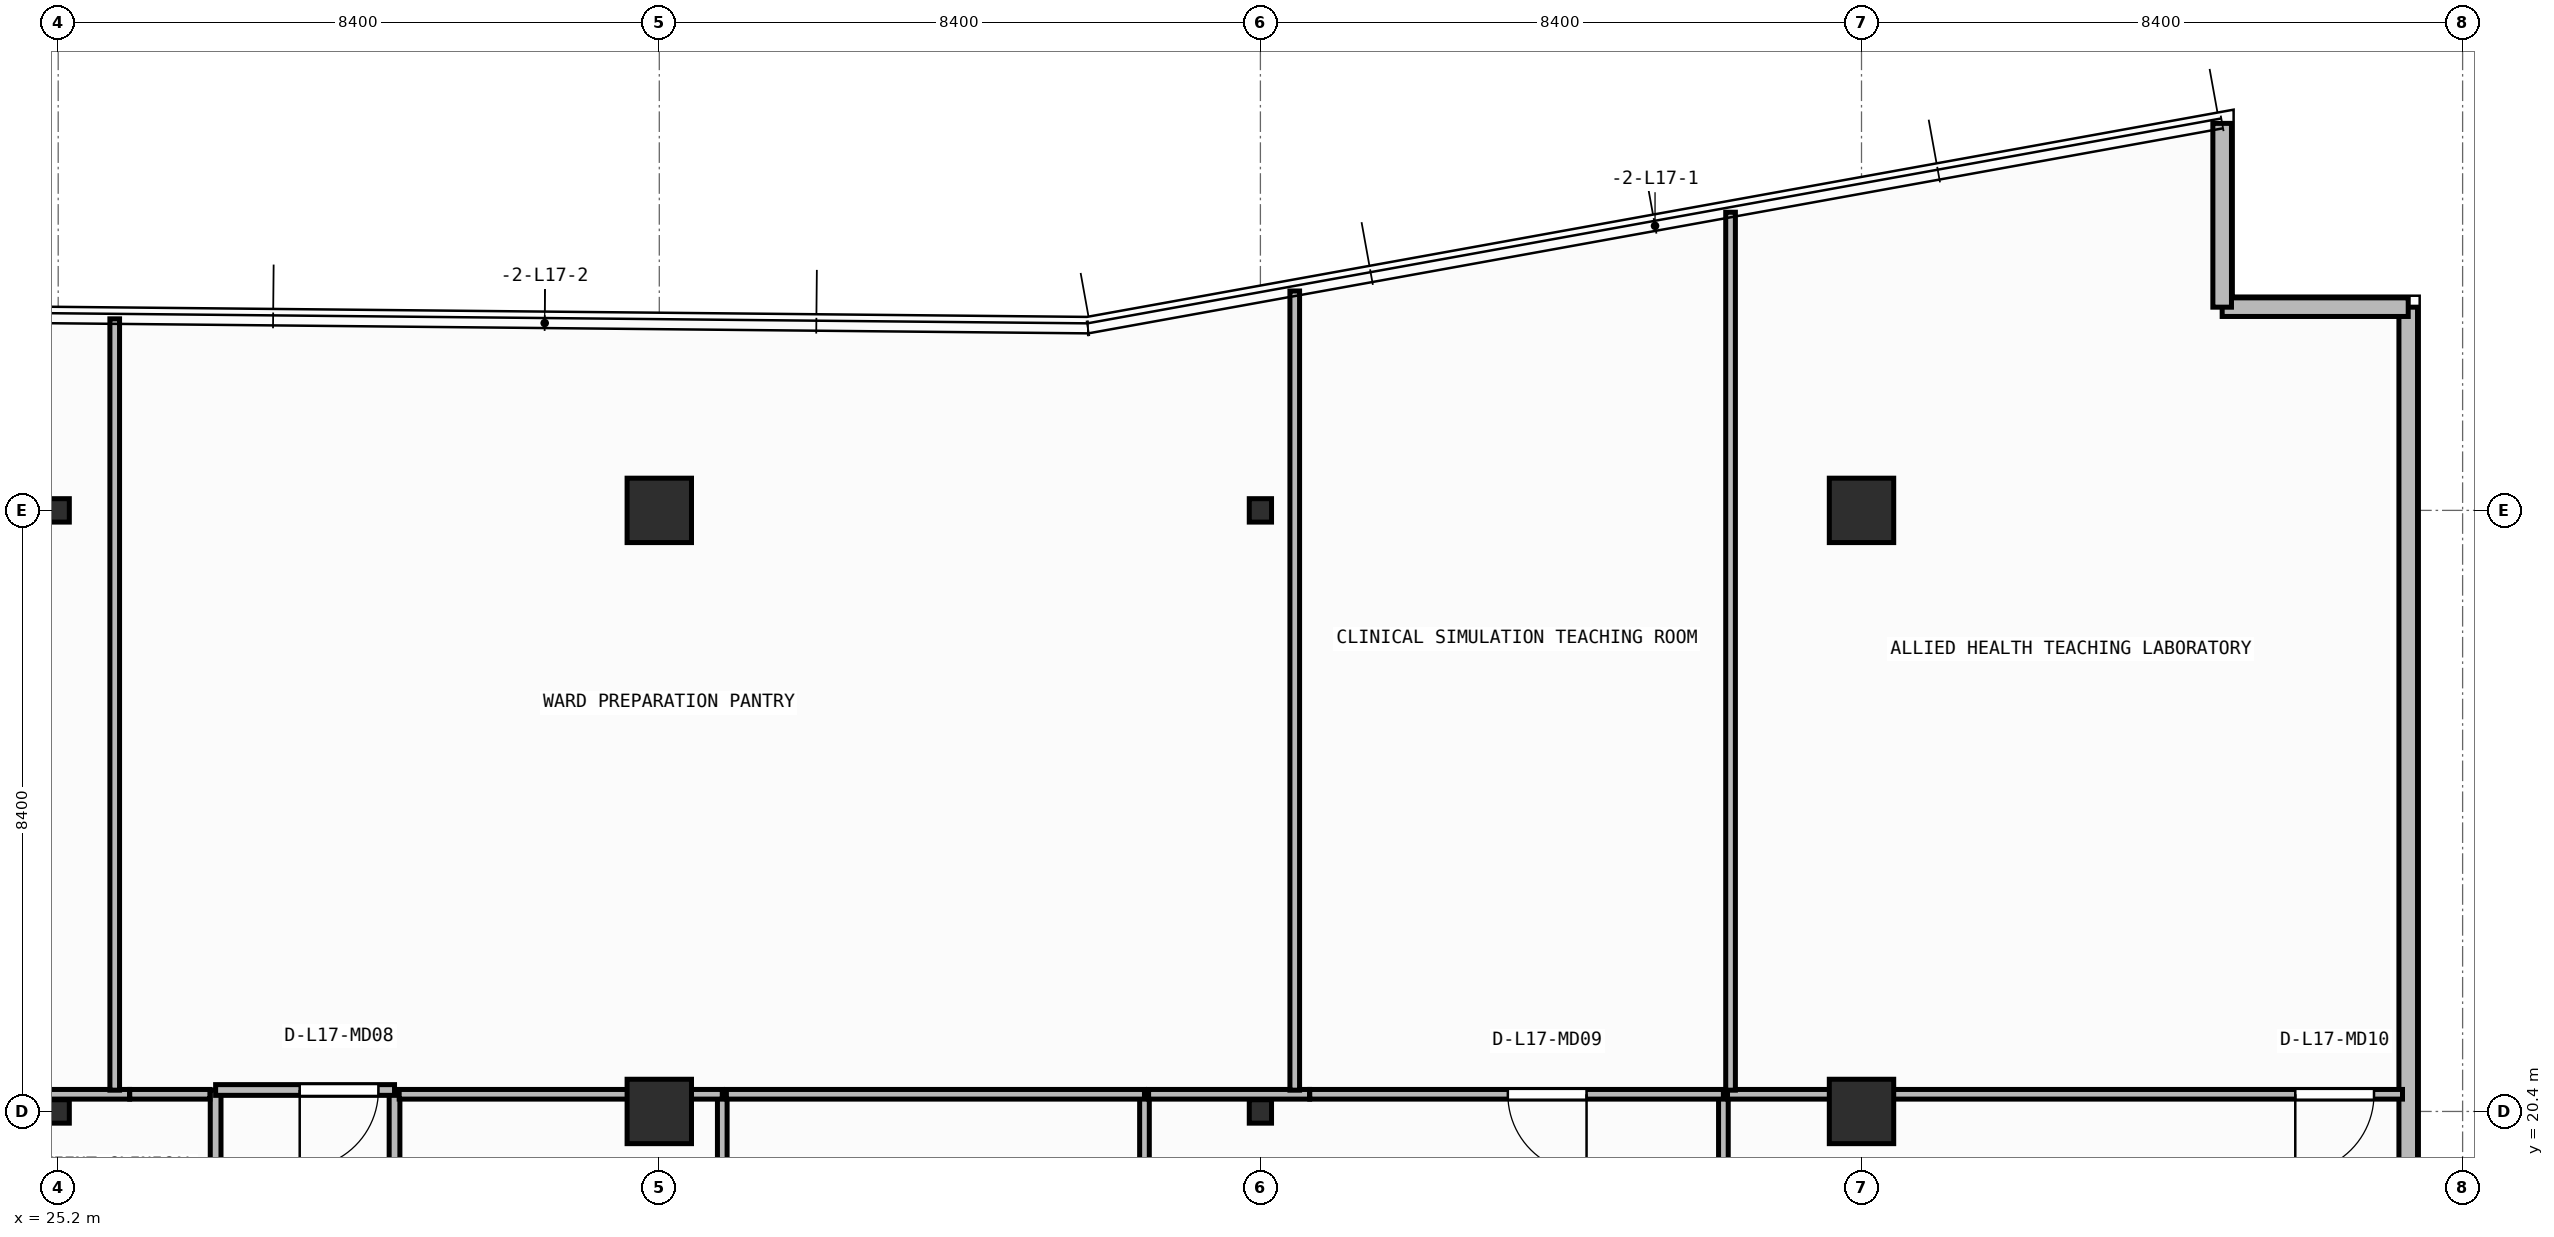
"""IFC4 building model, lengths in metres.
Left out: names, types, materials, properties, quantities, classifications, styles, units other than length and angle.
Written with IfcOpenShell. Run it as: python <this file> out.ifc"""

import sys

from ifc_helpers import new_model, si_unit, direction, frame, frame_2d, origin, origin_2d, place, context, subcontext, project, spatial, rectangle, i_section, extrude, element, fill, save


model = new_model("IFC4")
c1 = context("Model", 3, precision=1e-05, world=origin(), true_north=direction((0.0, 1.0)))
c2 = subcontext(c1, "Body", "Model", "MODEL_VIEW")
j1 = project(units=[si_unit("LENGTHUNIT", "METRE"), si_unit("PLANEANGLEUNIT", "RADIAN")], contexts=[c1])
p1 = place(None, origin())
s1 = spatial("IfcSite", under=j1, at=p1, CompositionType="ELEMENT")
p2 = place(p1, origin())
s2 = spatial("IfcBuilding", under=s1, at=p2, CompositionType="ELEMENT")
p3 = place(p2, frame((0.0, 0.0, 69.9)))
s3 = spatial("IfcBuildingStorey", under=s2, at=p3, CompositionType="ELEMENT", Elevation=69.9)
p4 = place(p3, frame((25.2, 20.4, 0.0), z_axis=(0.0, 0.0, 1.0), x_axis=(1.0, 0.0, 0.0)))
e1 = element("IfcColumn", 1, at=p4, inside=s3, PredefinedType="COLUMN", context=c2, shape_type="SweptSolid", body=[
    extrude(i_section(OverallWidth=0.311, OverallDepth=0.327, WebThickness=0.016, FlangeThickness=0.025, FilletRadius=0.017, at=origin_2d()), origin(), (0.0, 0.0, 1.0), 3.95),
])
p5 = place(p3, frame((33.6, 20.4, 0.0), z_axis=(0.0, 0.0, 1.0), x_axis=(1.0, 0.0, 0.0)))
e2 = element("IfcColumn", 2, at=p5, inside=s3, PredefinedType="COLUMN", context=c2, shape_type="SweptSolid", body=[
    extrude(rectangle(XDim=0.9, YDim=0.9, at=origin_2d()), origin(), (0.0, 0.0, 1.0), 3.95),
])
p6 = place(p3, frame((42.0, 20.4, 0.0), z_axis=(0.0, 0.0, 1.0), x_axis=(1.0, 0.0, 0.0)))
e3 = element("IfcColumn", 3, at=p6, inside=s3, PredefinedType="COLUMN", context=c2, shape_type="SweptSolid", body=[
    extrude(i_section(OverallWidth=0.311, OverallDepth=0.327, WebThickness=0.016, FlangeThickness=0.025, FilletRadius=0.017, at=origin_2d()), origin(), (0.0, 0.0, 1.0), 3.95),
])
p7 = place(p3, frame((50.4, 20.4, 0.0), z_axis=(0.0, 0.0, 1.0), x_axis=(1.0, 0.0, 0.0)))
e4 = element("IfcColumn", 4, at=p7, inside=s3, PredefinedType="COLUMN", context=c2, shape_type="SweptSolid", body=[
    extrude(rectangle(XDim=0.9, YDim=0.9, at=origin_2d()), origin(), (0.0, 0.0, 1.0), 3.95),
])
p8 = place(p3, frame((25.2, 28.8, 0.0), z_axis=(0.0, 0.0, 1.0), x_axis=(1.0, 0.0, 0.0)))
e5 = element("IfcColumn", 5, at=p8, inside=s3, PredefinedType="COLUMN", context=c2, shape_type="SweptSolid", body=[
    extrude(i_section(OverallWidth=0.311, OverallDepth=0.327, WebThickness=0.016, FlangeThickness=0.025, FilletRadius=0.017, at=origin_2d()), origin(), (0.0, 0.0, 1.0), 3.95),
])
p9 = place(p3, frame((33.6, 28.8, 0.0), z_axis=(0.0, 0.0, 1.0), x_axis=(1.0, 0.0, 0.0)))
e6 = element("IfcColumn", 6, at=p9, inside=s3, PredefinedType="COLUMN", context=c2, shape_type="SweptSolid", body=[
    extrude(rectangle(XDim=0.9, YDim=0.9, at=origin_2d()), origin(), (0.0, 0.0, 1.0), 3.95),
])
p10 = place(p3, frame((42.0, 28.8, 0.0), z_axis=(0.0, 0.0, 1.0), x_axis=(1.0, 0.0, 0.0)))
e7 = element("IfcColumn", 7, at=p10, inside=s3, PredefinedType="COLUMN", context=c2, shape_type="SweptSolid", body=[
    extrude(i_section(OverallWidth=0.311, OverallDepth=0.327, WebThickness=0.016, FlangeThickness=0.025, FilletRadius=0.017, at=origin_2d()), origin(), (0.0, 0.0, 1.0), 3.95),
])
p11 = place(p3, frame((50.4, 28.8, 0.0), z_axis=(0.0, 0.0, 1.0), x_axis=(1.0, 0.0, 0.0)))
e8 = element("IfcColumn", 8, at=p11, inside=s3, PredefinedType="COLUMN", context=c2, shape_type="SweptSolid", body=[
    extrude(rectangle(XDim=0.9, YDim=0.9, at=origin_2d()), origin(), (0.0, 0.0, 1.0), 3.95),
])
p12 = place(p3, frame((58.04, 7.16, 0.0), z_axis=(0.0, 0.0, 1.0), x_axis=(0.0, 1.0, 0.0)))
e9 = element("IfcWall", 9, at=p12, inside=s3, PredefinedType="STANDARD", context=c2, shape_type="SweptSolid", body=[
    extrude(rectangle(XDim=24.48, YDim=0.26, at=frame_2d((12.24, 0.0))), origin(), (0.0, 0.0, 1.0), 3.71),
])
p13 = place(p12, frame((8.87, 0.0, 0.0)))
e10 = element("IfcOpeningElement", 10, at=p13, cuts=e9, PredefinedType="OPENING", context=c2, shape_type="SweptSolid", body=[
    extrude(rectangle(XDim=1.3, YDim=2.15, at=frame_2d((0.65, 1.075))), frame((0.0, 0.14, 0.0), z_axis=(0.0, -1.0, 0.0), x_axis=(1.0, 0.0, 0.0)), (0.0, 0.0, 1.0), 0.28),
])
p14 = place(p3, frame((58.04, 31.64, 0.0), z_axis=(0.0, 0.0, 1.0), x_axis=(-1.0, 0.0, 0.0)))
e11 = element("IfcWall", 11, at=p14, inside=s3, PredefinedType="STANDARD", context=c2, shape_type="SweptSolid", body=[
    extrude(rectangle(XDim=2.6, YDim=0.26, at=frame_2d((1.3, 0.0))), origin(), (0.0, 0.0, 1.0), 3.71),
])
p15 = place(p3, frame((55.44, 31.64, 0.0), z_axis=(0.0, 0.0, 1.0), x_axis=(0.0, 1.0, 0.0)))
e12 = element("IfcWall", 12, at=p15, inside=s3, PredefinedType="STANDARD", context=c2, shape_type="SweptSolid", body=[
    extrude(rectangle(XDim=2.569, YDim=0.26, at=frame_2d((1.284, 0.0))), origin(), (0.0, 0.0, 1.0), 3.71),
])
for number, where, z_axis, x_axis in (
    (13, (27.4, 20.7, 0.0), (0.0, 0.0, 1.0), (0.0, -1.0, 0.0)),
    (14, (29.9, 14.7, 0.0), (0.0, 0.0, 1.0), (0.0, 1.0, 0.0)),
):
    element("IfcWall", number, at=place(p3, frame(where, z_axis=z_axis, x_axis=x_axis)), inside=s3, PredefinedType="PARTITIONING", context=c2, shape_type="SweptSolid", body=[
        extrude(rectangle(XDim=6.0, YDim=0.15, at=frame_2d((3.0, 0.0))), origin(), (0.0, 0.0, 1.0), 3.71),
    ])
p16 = place(p3, frame((29.9, 20.7, 0.0), z_axis=(0.0, 0.0, 1.0), x_axis=(-1.0, 0.0, 0.0)))
e15 = element("IfcWall", 15, at=p16, inside=s3, PredefinedType="PARTITIONING", context=c2, shape_type="SweptSolid", body=[
    extrude(rectangle(XDim=2.5, YDim=0.15, at=frame_2d((1.25, 0.0))), origin(), (0.0, 0.0, 1.0), 3.073),
])
p17 = place(p16, frame((0.225, 0.0, 0.0)))
e16 = element("IfcOpeningElement", 16, at=p17, cuts=e15, PredefinedType="OPENING", context=c2, shape_type="SweptSolid", body=[
    extrude(rectangle(XDim=1.1, YDim=2.1, at=frame_2d((0.55, 1.05))), frame((0.0, 0.085, 0.0), z_axis=(0.0, -1.0, 0.0), x_axis=(1.0, 0.0, 0.0)), (0.0, 0.0, 1.0), 0.17),
])
p18 = place(p3, frame((26.198, 20.64, 0.0), z_axis=(0.0, 0.0, 1.0), x_axis=(-1.0, 0.0, 0.0)))
e17 = element("IfcWall", 17, at=p18, inside=s3, PredefinedType="PARTITIONING", context=c2, shape_type="SweptSolid", body=[
    extrude(rectangle(XDim=3.41, YDim=0.135, at=frame_2d((1.705, 0.0))), origin(), (0.0, 0.0, 1.0), 3.073),
])
p19 = place(p3, frame((27.32, 20.64, 0.0), z_axis=(0.0, 0.0, 1.0), x_axis=(-1.0, 0.0, 0.0)))
e18 = element("IfcWall", 18, at=p19, inside=s3, PredefinedType="PARTITIONING", context=c2, shape_type="SweptSolid", body=[
    extrude(rectangle(XDim=1.121, YDim=0.135, at=frame_2d((0.56, 0.0))), origin(), (0.0, 0.0, 1.0), 3.073),
])
p20 = place(p3, frame((34.48, 14.76, 0.0), z_axis=(0.0, 0.0, 1.0), x_axis=(0.0, 1.0, 0.0)))
e19 = element("IfcWall", 19, at=p20, inside=s3, PredefinedType="PARTITIONING", context=c2, shape_type="SweptSolid", body=[
    extrude(rectangle(XDim=5.88, YDim=0.135, at=frame_2d((2.94, 0.0))), origin(), (0.0, 0.0, 1.0), 3.71),
])
p21 = place(p3, frame((34.48, 20.64, 0.0), z_axis=(0.0, 0.0, 1.0), x_axis=(-1.0, 0.0, 0.0)))
e20 = element("IfcWall", 20, at=p21, inside=s3, PredefinedType="PARTITIONING", context=c2, shape_type="SweptSolid", body=[
    extrude(rectangle(XDim=4.515, YDim=0.135, at=frame_2d((2.257, 0.0))), origin(), (0.0, 0.0, 1.0), 3.073),
])
p22 = place(p3, frame((40.38, 14.76, 0.0), z_axis=(0.0, 0.0, 1.0), x_axis=(0.0, 1.0, 0.0)))
e21 = element("IfcWall", 21, at=p22, inside=s3, PredefinedType="PARTITIONING", context=c2, shape_type="SweptSolid", body=[
    extrude(rectangle(XDim=5.88, YDim=0.135, at=frame_2d((2.94, 0.0))), origin(), (0.0, 0.0, 1.0), 3.71),
])
p23 = place(p3, frame((40.38, 20.64, 0.0), z_axis=(0.0, 0.0, 1.0), x_axis=(-1.0, 0.0, 0.0)))
e22 = element("IfcWall", 22, at=p23, inside=s3, PredefinedType="PARTITIONING", context=c2, shape_type="SweptSolid", body=[
    extrude(rectangle(XDim=5.842, YDim=0.135, at=frame_2d((2.921, 0.0))), origin(), (0.0, 0.0, 1.0), 3.073),
])
p24 = place(p3, frame((48.47, 14.76, 0.0), z_axis=(0.0, 0.0, 1.0), x_axis=(0.0, 1.0, 0.0)))
e23 = element("IfcWall", 23, at=p24, inside=s3, PredefinedType="PARTITIONING", context=c2, shape_type="SweptSolid", body=[
    extrude(rectangle(XDim=5.88, YDim=0.135, at=frame_2d((2.94, 0.0))), origin(), (0.0, 0.0, 1.0), 3.71),
])
p25 = place(p3, frame((42.688, 20.64, 0.0), z_axis=(0.0, 0.0, 1.0), x_axis=(-1.0, 0.0, 0.0)))
e24 = element("IfcWall", 24, at=p25, inside=s3, PredefinedType="PARTITIONING", context=c2, shape_type="SweptSolid", body=[
    extrude(rectangle(XDim=2.25, YDim=0.135, at=frame_2d((1.125, 0.0))), origin(), (0.0, 0.0, 1.0), 3.073),
])
p26 = place(p3, frame((48.47, 20.64, 0.0), z_axis=(0.0, 0.0, 1.0), x_axis=(-1.0, 0.0, 0.0)))
e25 = element("IfcWall", 25, at=p26, inside=s3, PredefinedType="PARTITIONING", context=c2, shape_type="SweptSolid", body=[
    extrude(rectangle(XDim=5.781, YDim=0.135, at=frame_2d((2.89, 0.0))), origin(), (0.0, 0.0, 1.0), 3.073),
])
p27 = place(p26, frame((1.912, 0.0, 0.0)))
e26 = element("IfcOpeningElement", 26, at=p27, cuts=e25, PredefinedType="OPENING", context=c2, shape_type="SweptSolid", body=[
    extrude(rectangle(XDim=1.1, YDim=2.1, at=frame_2d((0.55, 1.05))), frame((0.0, 0.077, 0.0), z_axis=(0.0, -1.0, 0.0), x_axis=(1.0, 0.0, 0.0)), (0.0, 0.0, 1.0), 0.155),
])
p28 = place(p3, frame((57.96, 20.64, 0.0), z_axis=(0.0, 0.0, 1.0), x_axis=(-1.0, 0.0, 0.0)))
e27 = element("IfcWall", 27, at=p28, inside=s3, PredefinedType="PARTITIONING", context=c2, shape_type="SweptSolid", body=[
    extrude(rectangle(XDim=9.432, YDim=0.135, at=frame_2d((4.716, 0.0))), origin(), (0.0, 0.0, 1.0), 3.073),
])
p29 = place(p28, frame((0.398, 0.0, 0.0)))
e28 = element("IfcOpeningElement", 28, at=p29, cuts=e27, PredefinedType="OPENING", context=c2, shape_type="SweptSolid", body=[
    extrude(rectangle(XDim=1.1, YDim=2.1, at=frame_2d((0.55, 1.05))), frame((0.0, 0.077, 0.0), z_axis=(0.0, -1.0, 0.0), x_axis=(1.0, 0.0, 0.0)), (0.0, 0.0, 1.0), 0.155),
])
p30 = place(p3, frame((25.99, 20.698, 0.0), z_axis=(0.0, 0.0, 1.0), x_axis=(0.0, 1.0, 0.0)))
e29 = element("IfcWall", 29, at=p30, inside=s3, PredefinedType="PARTITIONING", context=c2, shape_type="SweptSolid", body=[
    extrude(rectangle(XDim=10.779, YDim=0.135, at=frame_2d((5.39, 0.0))), origin(), (0.0, 0.0, 1.0), 3.71),
])
p31 = place(p3, frame((42.48, 20.698, 0.0), z_axis=(0.0, 0.0, 1.0), x_axis=(0.0, 1.0, 0.0)))
e30 = element("IfcWall", 30, at=p31, inside=s3, PredefinedType="PARTITIONING", context=c2, shape_type="SweptSolid", body=[
    extrude(rectangle(XDim=11.169, YDim=0.135, at=frame_2d((5.584, 0.0))), origin(), (0.0, 0.0, 1.0), 3.073),
])
p32 = place(p3, frame((48.57, 20.698, 0.0), z_axis=(0.0, 0.0, 1.0), x_axis=(0.0, 1.0, 0.0)))
e31 = element("IfcWall", 31, at=p32, inside=s3, PredefinedType="PARTITIONING", context=c2, shape_type="SweptSolid", body=[
    extrude(rectangle(XDim=12.269, YDim=0.135, at=frame_2d((6.135, 0.0))), origin(), (0.0, 0.0, 1.0), 3.71),
])
p33 = place(p17, origin())
e32 = element("IfcDoor", 32, at=p33, inside=s3, OperationType="SINGLE_SWING_RIGHT", PredefinedType="DOOR", context=c2, shape_type="SweptSolid", body=[
    extrude(rectangle(XDim=1.1, YDim=2.1, at=frame_2d((0.55, 1.05))), frame((0.0, 0.025, 0.0), z_axis=(0.0, -1.0, 0.0), x_axis=(1.0, 0.0, 0.0)), (0.0, 0.0, 1.0), 0.05),
])
fill(e16, e32)
p34 = place(p27, origin())
e33 = element("IfcDoor", 33, at=p34, inside=s3, OperationType="SINGLE_SWING_LEFT", PredefinedType="DOOR", context=c2, shape_type="SweptSolid", body=[
    extrude(rectangle(XDim=1.1, YDim=2.1, at=frame_2d((0.55, 1.05))), frame((0.0, 0.025, 0.0), z_axis=(0.0, -1.0, 0.0), x_axis=(1.0, 0.0, 0.0)), (0.0, 0.0, 1.0), 0.05),
])
fill(e26, e33)
p35 = place(p29, origin())
e34 = element("IfcDoor", 34, at=p35, inside=s3, OperationType="SINGLE_SWING_RIGHT", PredefinedType="DOOR", context=c2, shape_type="SweptSolid", body=[
    extrude(rectangle(XDim=1.1, YDim=2.1, at=frame_2d((0.55, 1.05))), frame((0.0, 0.025, 0.0), z_axis=(0.0, -1.0, 0.0), x_axis=(1.0, 0.0, 0.0)), (0.0, 0.0, 1.0), 0.05),
])
fill(e28, e34)
save(model, sys.argv[1])
